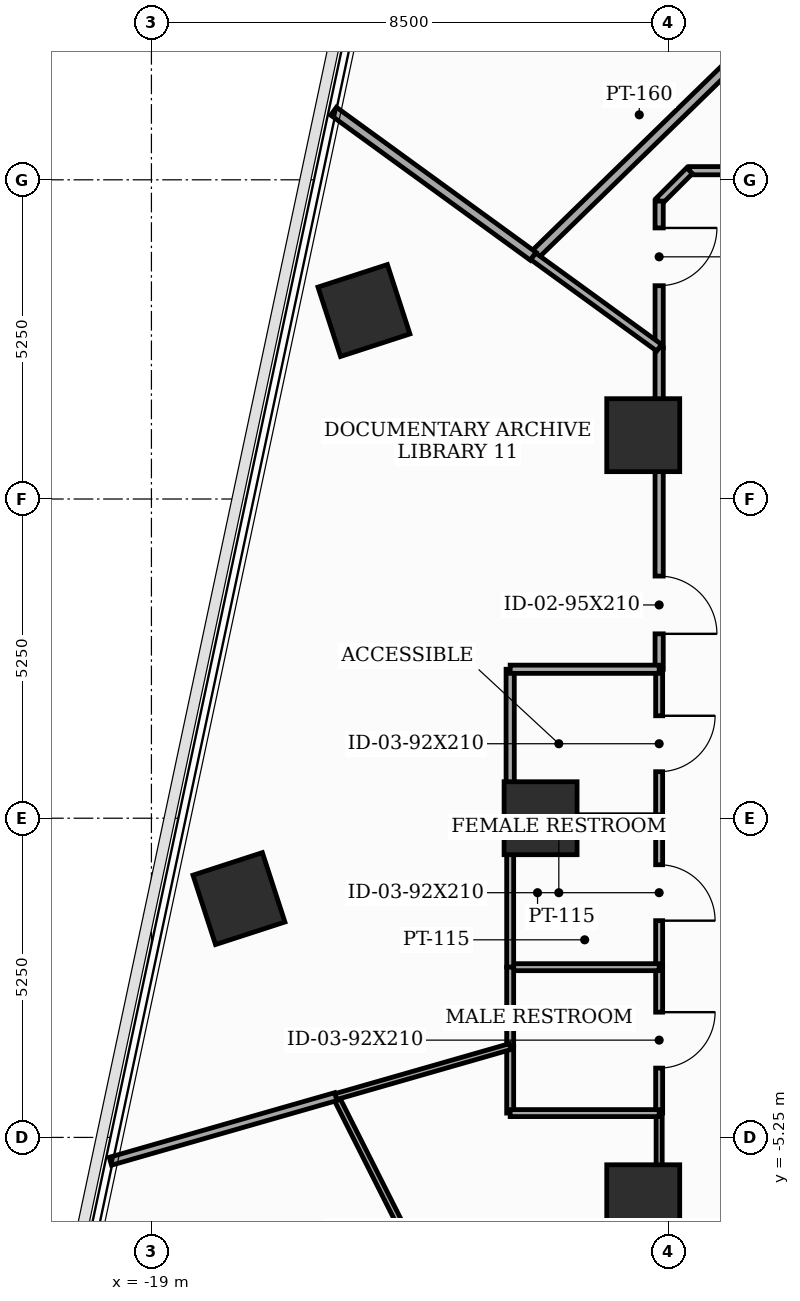
"""IFC4 building model, lengths in metres.
Left out: names, types, materials, properties, quantities, classifications, styles, units other than length and angle.
Written with IfcOpenShell. Run it as: python <this file> out.ifc"""

import sys

from ifc_helpers import new_model, si_unit, direction, frame, frame_2d, origin, origin_2d, place, context, subcontext, project, spatial, rectangle, extrude, element, fill, save


model = new_model("IFC4")
c1 = context("Model", 3, precision=1e-05, world=origin(), true_north=direction((0.0, 1.0)))
c2 = subcontext(c1, "Body", "Model", "MODEL_VIEW")
j1 = project(units=[si_unit("LENGTHUNIT", "METRE"), si_unit("PLANEANGLEUNIT", "RADIAN")], contexts=[c1])
p1 = place(None, origin())
s1 = spatial("IfcSite", under=j1, at=p1, CompositionType="ELEMENT")
p2 = place(p1, origin())
s2 = spatial("IfcBuilding", under=s1, at=p2, CompositionType="ELEMENT")
p3 = place(p2, frame((0.0, 0.0, 90.3)))
s3 = spatial("IfcBuildingStorey", under=s2, at=p3, CompositionType="ELEMENT", Elevation=90.3)
for number, where, z_axis, x_axis in (
    (1, (-10.912, 6.3, 0.0), (0.0, 0.0, 1.0), (1.0, 0.0, 0.0)),
    (2, (-12.6, 0.0, 0.0), (0.0, 0.0, 1.0), (1.0, 0.0, 0.0)),
    (3, (-10.912, -6.3, 0.0), (0.0, 0.0, 1.0), (1.0, 0.0, 0.0)),
    (4, (-15.505, 8.35, 0.0), (0.0, 0.0, 1.0), (0.951, 0.309, 0.0)),
    (5, (-17.561, -1.322, 0.0), (0.0, 0.0, 1.0), (0.951, 0.309, 0.0)),
):
    element("IfcColumn", number, at=place(p3, frame(where, z_axis=z_axis, x_axis=x_axis)), inside=s3, PredefinedType="COLUMN", context=c2, shape_type="SweptSolid", body=[
        extrude(rectangle(XDim=1.2, YDim=1.2, at=origin_2d()), origin(), (0.0, 0.0, 1.0), 3.7),
    ])
p4 = place(p3, frame((-10.65, 0.0, 0.0), z_axis=(0.0, 0.0, 1.0), x_axis=(0.0, -1.0, 0.0)))
e6 = element("IfcWall", 6, at=p4, inside=s3, PredefinedType="PARTITIONING", context=c2, shape_type="SweptSolid", body=[
    extrude(rectangle(XDim=2.45, YDim=0.115, at=frame_2d((1.225, 0.0))), origin(), (0.0, 0.0, 1.0), 2.785),
])
p5 = place(p4, frame((0.765, 0.0, 0.0)))
e7 = element("IfcOpeningElement", 7, at=p5, cuts=e6, PredefinedType="OPENING", context=c2, shape_type="SweptSolid", body=[
    extrude(rectangle(XDim=0.92, YDim=2.1, at=frame_2d((0.46, 1.05))), frame((0.0, 0.067, 0.0), z_axis=(0.0, -1.0, 0.0), x_axis=(1.0, 0.0, 0.0)), (0.0, 0.0, 1.0), 0.135),
])
p6 = place(p3, frame((-10.65, -2.45, 0.0), z_axis=(0.0, 0.0, 1.0), x_axis=(0.0, -1.0, 0.0)))
e8 = element("IfcWall", 8, at=p6, inside=s3, PredefinedType="PARTITIONING", context=c2, shape_type="SweptSolid", body=[
    extrude(rectangle(XDim=2.4, YDim=0.115, at=frame_2d((1.2, 0.0))), origin(), (0.0, 0.0, 1.0), 3.5),
])
p7 = place(p6, frame((0.74, 0.0, 0.0)))
e9 = element("IfcOpeningElement", 9, at=p7, cuts=e8, PredefinedType="OPENING", context=c2, shape_type="SweptSolid", body=[
    extrude(rectangle(XDim=0.92, YDim=2.1, at=frame_2d((0.46, 1.05))), frame((0.0, 0.067, 0.0), z_axis=(0.0, -1.0, 0.0), x_axis=(1.0, 0.0, 0.0)), (0.0, 0.0, 1.0), 0.135),
])
p8 = place(p3, frame((-10.65, -4.85, 0.0), z_axis=(0.0, 0.0, 1.0), x_axis=(0.0, -1.0, 0.0)))
e10 = element("IfcWall", 10, at=p8, inside=s3, PredefinedType="MOVABLE", context=c2, shape_type="SweptSolid", body=[
    extrude(rectangle(XDim=5.3, YDim=0.1, at=frame_2d((2.65, 0.0))), origin(), (0.0, 0.0, 1.0), 2.785),
])
p9 = place(p8, frame((3.765, 0.0, 0.0)))
e11 = element("IfcOpeningElement", 11, at=p9, cuts=e10, PredefinedType="OPENING", context=c2, shape_type="SweptSolid", body=[
    extrude(rectangle(XDim=0.95, YDim=2.1, at=frame_2d((0.475, 1.05))), frame((0.0, 0.06, 0.0), z_axis=(0.0, -1.0, 0.0), x_axis=(1.0, 0.0, 0.0)), (0.0, 0.0, 1.0), 0.12),
])
p10 = place(p3, frame((-2.264, 10.65, 0.0), z_axis=(0.0, 0.0, 1.0), x_axis=(-1.0, 0.0, 0.0)))
e12 = element("IfcWall", 12, at=p10, inside=s3, PredefinedType="PARTITIONING", context=c2, shape_type="SweptSolid", body=[
    extrude(rectangle(XDim=7.886, YDim=0.135, at=frame_2d((3.943, 0.0))), origin(), (0.0, 0.0, 1.0), 2.785),
])
p11 = place(p3, frame((-10.15, 10.65, 0.0), z_axis=(0.0, 0.0, 1.0), x_axis=(-0.707106781187, -0.707106781187, 0.0)))
e13 = element("IfcWall", 13, at=p11, inside=s3, PredefinedType="PARTITIONING", context=c2, shape_type="SweptSolid", body=[
    extrude(rectangle(XDim=0.707, YDim=0.135, at=frame_2d((0.354, 0.0))), origin(), (0.0, 0.0, 1.0), 3.5),
])
p12 = place(p3, frame((-10.65, 10.15, 0.0), z_axis=(0.0, 0.0, 1.0), x_axis=(0.0, -1.0, 0.0)))
e14 = element("IfcWall", 14, at=p12, inside=s3, PredefinedType="PARTITIONING", context=c2, shape_type="SweptSolid", body=[
    extrude(rectangle(XDim=2.412, YDim=0.135, at=frame_2d((1.206, 0.0))), origin(), (0.0, 0.0, 1.0), 3.5),
])
p13 = place(p12, frame((0.442, 0.0, 0.0)))
e15 = element("IfcOpeningElement", 15, at=p13, cuts=e14, PredefinedType="OPENING", context=c2, shape_type="SweptSolid", body=[
    extrude(rectangle(XDim=0.95, YDim=2.1, at=frame_2d((0.475, 1.05))), frame((0.0, 0.077, 0.0), z_axis=(0.0, -1.0, 0.0), x_axis=(1.0, 0.0, 0.0)), (0.0, 0.0, 1.0), 0.155),
])
p14 = place(p3, frame((-10.65, 7.738, 0.0), z_axis=(0.0, 0.0, 1.0), x_axis=(0.0, -1.0, 0.0)))
e16 = element("IfcWall", 16, at=p14, inside=s3, PredefinedType="PARTITIONING", context=c2, shape_type="SweptSolid", body=[
    extrude(rectangle(XDim=5.288, YDim=0.135, at=frame_2d((2.644, 0.0))), origin(), (0.0, 0.0, 1.0), 2.785),
])
p15 = place(p14, frame((3.755, 0.0, 0.0)))
e17 = element("IfcOpeningElement", 17, at=p15, cuts=e16, PredefinedType="OPENING", context=c2, shape_type="SweptSolid", body=[
    extrude(rectangle(XDim=0.95, YDim=2.1, at=frame_2d((0.475, 1.05))), frame((0.0, 0.077, 0.0), z_axis=(0.0, -1.0, 0.0), x_axis=(1.0, 0.0, 0.0)), (0.0, 0.0, 1.0), 0.155),
])
p16 = place(p3, frame((-10.65, 2.45, 0.0), z_axis=(0.0, 0.0, 1.0), x_axis=(0.0, -1.0, 0.0)))
e18 = element("IfcWall", 18, at=p16, inside=s3, PredefinedType="PARTITIONING", context=c2, shape_type="SweptSolid", body=[
    extrude(rectangle(XDim=2.45, YDim=0.115, at=frame_2d((1.225, 0.0))), origin(), (0.0, 0.0, 1.0), 2.785),
])
p17 = place(p16, frame((0.765, 0.0, 0.0)))
e19 = element("IfcOpeningElement", 19, at=p17, cuts=e18, PredefinedType="OPENING", context=c2, shape_type="SweptSolid", body=[
    extrude(rectangle(XDim=0.92, YDim=2.1, at=frame_2d((0.46, 1.05))), frame((0.0, 0.067, 0.0), z_axis=(0.0, -1.0, 0.0), x_axis=(1.0, 0.0, 0.0)), (0.0, 0.0, 1.0), 0.135),
])
p18 = place(p3, frame((-13.1, -2.45, 0.0), z_axis=(0.0, 0.0, 1.0), x_axis=(1.0, 0.0, 0.0)))
e20 = element("IfcWall", 20, at=p18, inside=s3, PredefinedType="PARTITIONING", context=c2, shape_type="SweptSolid", body=[
    extrude(rectangle(XDim=2.45, YDim=0.115, at=frame_2d((1.225, 0.0))), origin(), (0.0, 0.0, 1.0), 2.785),
])
p19 = place(p3, frame((-13.1, 0.0, 0.0), z_axis=(0.0, 0.0, 1.0), x_axis=(0.0, -1.0, 0.0)))
e21 = element("IfcWall", 21, at=p19, inside=s3, PredefinedType="PARTITIONING", context=c2, shape_type="SweptSolid", body=[
    extrude(rectangle(XDim=2.45, YDim=0.115, at=frame_2d((1.225, 0.0))), origin(), (0.0, 0.0, 1.0), 2.785),
])
p20 = place(p3, frame((-10.65, 0.0, 0.0), z_axis=(0.0, 0.0, 1.0), x_axis=(-1.0, 0.0, 0.0)))
e22 = element("IfcWall", 22, at=p20, inside=s3, PredefinedType="PARTITIONING", context=c2, shape_type="SweptSolid", body=[
    extrude(rectangle(XDim=2.45, YDim=0.115, at=frame_2d((1.225, 0.0))), origin(), (0.0, 0.0, 1.0), 2.785),
])
p21 = place(p3, frame((-13.1, -3.756, 0.0), z_axis=(0.0, 0.0, 1.0), x_axis=(0.0, -1.0, 0.0)))
e23 = element("IfcWall", 23, at=p21, inside=s3, PredefinedType="PARTITIONING", context=c2, shape_type="SweptSolid", body=[
    extrude(rectangle(XDim=1.094, YDim=0.115, at=frame_2d((0.547, 0.0))), origin(), (0.0, 0.0, 1.0), 3.5),
])
p22 = place(p3, frame((-13.1, -4.85, 0.0), z_axis=(0.0, 0.0, 1.0), x_axis=(1.0, 0.0, 0.0)))
e24 = element("IfcWall", 24, at=p22, inside=s3, PredefinedType="PARTITIONING", context=c2, shape_type="SweptSolid", body=[
    extrude(rectangle(XDim=2.45, YDim=0.115, at=frame_2d((1.225, 0.0))), origin(), (0.0, 0.0, 1.0), 2.785),
])
p23 = place(p3, frame((-13.1, -2.45, 0.0), z_axis=(0.0, 0.0, 1.0), x_axis=(0.0, -1.0, 0.0)))
e25 = element("IfcWall", 25, at=p23, inside=s3, PredefinedType="PARTITIONING", context=c2, shape_type="SweptSolid", body=[
    extrude(rectangle(XDim=1.306, YDim=0.115, at=frame_2d((0.653, 0.0))), origin(), (0.0, 0.0, 1.0), 3.5),
])
p24 = place(p3, frame((-15.968, -4.579, 0.0), z_axis=(0.0, 0.0, 1.0), x_axis=(0.450166439867, -0.892944665933, 0.0)))
e26 = element("IfcWall", 26, at=p24, inside=s3, PredefinedType="MOVABLE", context=c2, shape_type="SweptSolid", body=[
    extrude(rectangle(XDim=6.642, YDim=0.1, at=frame_2d((3.321, 0.0))), origin(), (0.0, 0.0, 1.0), 2.785),
])
p25 = place(p3, frame((-13.1, -3.756, 0.0), z_axis=(0.0, 0.0, 1.0), x_axis=(-0.961205264208, -0.275834080671, 0.0)))
e27 = element("IfcWall", 27, at=p25, inside=s3, PredefinedType="MOVABLE", context=c2, shape_type="SweptSolid", body=[
    extrude(rectangle(XDim=2.984, YDim=0.1, at=frame_2d((1.492, 0.0))), origin(), (0.0, 0.0, 1.0), 3.125),
])
p26 = place(p3, frame((-15.968, -4.579, 0.0), z_axis=(0.0, 0.0, 1.0), x_axis=(-0.961294264275, -0.275523751194, 0.0)))
e28 = element("IfcWall", 28, at=p26, inside=s3, PredefinedType="PARTITIONING", context=c2, shape_type="SweptSolid", body=[
    extrude(rectangle(XDim=3.856, YDim=0.135, at=frame_2d((1.928, 0.0))), origin(), (0.0, 0.0, 1.0), 2.935),
])
p27 = place(p3, frame((-12.721, 9.242, 0.0), z_axis=(0.0, 0.0, 1.0), x_axis=(0.716351016203, 0.697740081682, 0.0)))
e29 = element("IfcWall", 29, at=p27, inside=s3, PredefinedType="PARTITIONING", context=c2, shape_type="SweptSolid", body=[
    extrude(rectangle(XDim=5.746, YDim=0.16, at=frame_2d((2.873, 0.0))), origin(), (0.0, 0.0, 1.0), 2.785),
])
p28 = place(p3, frame((-16.004, 11.628, 0.0), z_axis=(0.0, 0.0, 1.0), x_axis=(0.80899612579, -0.587813974364, 0.0)))
e30 = element("IfcWall", 30, at=p28, inside=s3, PredefinedType="PARTITIONING", context=c2, shape_type="SweptSolid", body=[
    extrude(rectangle(XDim=4.059, YDim=0.16, at=frame_2d((2.029, 0.0))), origin(), (0.0, 0.0, 1.0), 2.935),
])
p29 = place(p3, frame((-12.721, 9.242, 0.0), z_axis=(0.0, 0.0, 1.0), x_axis=(0.80916485127, -0.58758169089, 0.0)))
e31 = element("IfcWall", 31, at=p29, inside=s3, PredefinedType="PARTITIONING", context=c2, shape_type="SweptSolid", body=[
    extrude(rectangle(XDim=2.56, YDim=0.135, at=frame_2d((1.28, 0.0))), origin(), (0.0, 0.0, 1.0), 3.125),
])
p30 = place(p3, frame((-13.1, 0.0, 0.0), z_axis=(0.0, 0.0, 1.0), x_axis=(0.0, 1.0, 0.0)))
e32 = element("IfcWall", 32, at=p30, inside=s3, PredefinedType="PARTITIONING", context=c2, shape_type="SweptSolid", body=[
    extrude(rectangle(XDim=2.45, YDim=0.135, at=frame_2d((1.225, 0.0))), origin(), (0.0, 0.0, 1.0), 2.785),
])
p31 = place(p3, frame((-13.1, 2.45, 0.0), z_axis=(0.0, 0.0, 1.0), x_axis=(1.0, 0.0, 0.0)))
e33 = element("IfcWall", 33, at=p31, inside=s3, PredefinedType="PARTITIONING", context=c2, shape_type="SweptSolid", body=[
    extrude(rectangle(XDim=2.45, YDim=0.135, at=frame_2d((1.225, 0.0))), origin(), (0.0, 0.0, 1.0), 2.785),
])
p32 = place(p5, origin())
e34 = element("IfcDoor", 34, at=p32, inside=s3, OperationType="SINGLE_SWING_RIGHT", PredefinedType="DOOR", context=c2, shape_type="SweptSolid", body=[
    extrude(rectangle(XDim=0.92, YDim=2.1, at=frame_2d((0.46, 1.05))), frame((0.0, 0.025, 0.0), z_axis=(0.0, -1.0, 0.0), x_axis=(1.0, 0.0, 0.0)), (0.0, 0.0, 1.0), 0.05),
])
fill(e7, e34)
p33 = place(p7, origin())
e35 = element("IfcDoor", 35, at=p33, inside=s3, OperationType="SINGLE_SWING_LEFT", PredefinedType="DOOR", context=c2, shape_type="SweptSolid", body=[
    extrude(rectangle(XDim=0.92, YDim=2.1, at=frame_2d((0.46, 1.05))), frame((0.0, 0.025, 0.0), z_axis=(0.0, -1.0, 0.0), x_axis=(1.0, 0.0, 0.0)), (0.0, 0.0, 1.0), 0.05),
])
fill(e9, e35)
p34 = place(p13, origin())
e36 = element("IfcDoor", 36, at=p34, inside=s3, OperationType="SINGLE_SWING_LEFT", PredefinedType="DOOR", context=c2, shape_type="SweptSolid", body=[
    extrude(rectangle(XDim=0.95, YDim=2.1, at=frame_2d((0.475, 1.05))), frame((0.0, 0.025, 0.0), z_axis=(0.0, -1.0, 0.0), x_axis=(1.0, 0.0, 0.0)), (0.0, 0.0, 1.0), 0.05),
])
fill(e15, e36)
p35 = place(p15, origin())
e37 = element("IfcDoor", 37, at=p35, inside=s3, OperationType="SINGLE_SWING_RIGHT", PredefinedType="DOOR", context=c2, shape_type="SweptSolid", body=[
    extrude(rectangle(XDim=0.95, YDim=2.1, at=frame_2d((0.475, 1.05))), frame((0.0, 0.025, 0.0), z_axis=(0.0, -1.0, 0.0), x_axis=(1.0, 0.0, 0.0)), (0.0, 0.0, 1.0), 0.05),
])
fill(e17, e37)
p36 = place(p17, origin())
e38 = element("IfcDoor", 38, at=p36, inside=s3, OperationType="SINGLE_SWING_LEFT", PredefinedType="DOOR", context=c2, shape_type="SweptSolid", body=[
    extrude(rectangle(XDim=0.92, YDim=2.1, at=frame_2d((0.46, 1.05))), frame((0.0, 0.025, 0.0), z_axis=(0.0, -1.0, 0.0), x_axis=(1.0, 0.0, 0.0)), (0.0, 0.0, 1.0), 0.05),
])
fill(e19, e38)
save(model, sys.argv[1])
